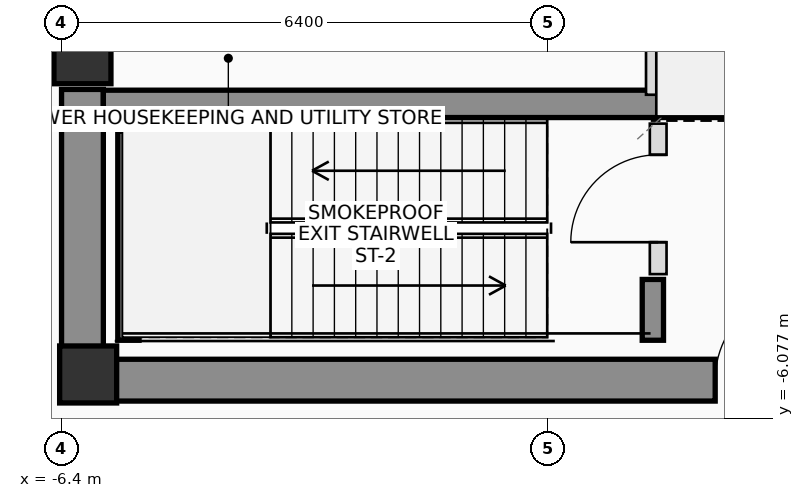
"""IFC4 building model, lengths in metres.
Left out: names, types, materials, properties, quantities, classifications, styles, units other than length and angle.
Written with IfcOpenShell. Run it as: python <this file> out.ifc"""

import sys

from ifc_helpers import new_model, si_unit, direction, frame, frame_2d, origin, origin_2d, place, context, subcontext, project, spatial, rectangle, extrude, source, transform, mapped, element, fill, save


model = new_model("IFC4")
c1 = context("Model", 3, precision=1e-05, world=origin(), true_north=direction((0.0, 1.0)))
c2 = subcontext(c1, "Body", "Model", "MODEL_VIEW")
j1 = project(units=[si_unit("LENGTHUNIT", "METRE"), si_unit("PLANEANGLEUNIT", "RADIAN")], contexts=[c1])
p1 = place(None, origin())
s1 = spatial("IfcSite", under=j1, at=p1, CompositionType="ELEMENT")
p2 = place(p1, origin())
s2 = spatial("IfcBuilding", under=s1, at=p2, CompositionType="ELEMENT")
p3 = place(p2, frame((0.0, 0.0, 224.15)))
s3 = spatial("IfcBuildingStorey", under=s2, at=p3, CompositionType="ELEMENT", Elevation=224.15)
m1 = source(origin(), c2, "Body", "SweptSolid", [
    extrude(rectangle(XDim=0.75, YDim=0.75, at=origin_2d()), origin(), (0.0, 0.0, 1.0), 4.5),
])
p4 = place(p3, frame((-6.05, -5.5, 0.0), z_axis=(0.0, 0.0, 1.0), x_axis=(1.0, 0.0, 0.0)))
e1 = element("IfcColumn", 1, at=p4, inside=s3, PredefinedType="COLUMN", context=c2, shape_type="MappedRepresentation", body=[
    mapped(m1, transform((0.0, 0.0, 0.0), scale=1.0)),
])
p5 = place(p3, frame((-6.4, -5.575, 0.0), z_axis=(0.0, 0.0, 1.0), x_axis=(1.0, 0.0, 0.0)))
e2 = element("IfcWall", 2, at=p5, inside=s3, PredefinedType="SHEAR", context=c2, shape_type="SweptSolid", body=[
    extrude(rectangle(XDim=12.8, YDim=0.55, at=frame_2d((6.4, 0.0))), origin(), (0.0, 0.0, 1.0), 4.5),
])
p6 = place(p5, frame((8.6, 0.0, 0.0)))
e3 = element("IfcOpeningElement", 3, at=p6, cuts=e2, PredefinedType="OPENING", context=c2, shape_type="SweptSolid", body=[
    extrude(rectangle(XDim=1.2, YDim=2.2, at=frame_2d((0.6, 1.1))), frame((0.0, 0.285, 0.0), z_axis=(0.0, -1.0, 0.0), x_axis=(1.0, 0.0, 0.0)), (0.0, 0.0, 1.0), 0.57),
])
p7 = place(p3, frame((-6.125, -5.3, 0.0), z_axis=(0.0, 0.0, 1.0), x_axis=(0.0, 1.0, 0.0)))
e4 = element("IfcWall", 4, at=p7, inside=s3, PredefinedType="SHEAR", context=c2, shape_type="SweptSolid", body=[
    extrude(rectangle(XDim=3.55, YDim=0.55, at=frame_2d((1.775, 0.0))), origin(), (0.0, 0.0, 1.0), 4.5),
])
p8 = place(p3, frame((-5.85, -1.94, 0.0), z_axis=(0.0, 0.0, 1.0), x_axis=(1.0, 0.0, 0.0)))
e5 = element("IfcWall", 5, at=p8, inside=s3, PredefinedType="SHEAR", context=c2, shape_type="SweptSolid", body=[
    extrude(rectangle(XDim=11.7, YDim=0.36, at=frame_2d((5.85, 0.0))), origin(), (0.0, 0.0, 1.0), 4.5),
])
p9 = place(p3, frame((-5.52, -5.05, 0.0), z_axis=(0.0, 0.0, 1.0), x_axis=(0.0, 1.0, 0.0)))
e6 = element("IfcWall", 6, at=p9, inside=s3, PredefinedType="SHEAR", context=c2, shape_type="SweptSolid", body=[
    extrude(rectangle(XDim=2.75, YDim=0.28, at=frame_2d((1.375, 0.0))), origin(), (0.0, 0.0, 1.0), 4.5),
])
p10 = place(p3, frame((1.38, -5.05, 0.0), z_axis=(0.0, 0.0, 1.0), x_axis=(0.0, 1.0, 0.0)))
e7 = element("IfcWall", 7, at=p10, inside=s3, PredefinedType="SHEAR", context=c2, shape_type="SweptSolid", body=[
    extrude(rectangle(XDim=0.8, YDim=0.28, at=frame_2d((0.4, 0.0))), origin(), (0.0, 0.0, 1.0), 4.5),
])
p11 = place(p3, frame((-6.125, -1.3, 0.0), z_axis=(0.0, 0.0, 1.0), x_axis=(1.0, 0.0, 0.0)))
e8 = element("IfcColumn", 8, at=p11, inside=s3, PredefinedType="COLUMN", context=c2, shape_type="MappedRepresentation", body=[
    mapped(m1, transform((0.0, 0.0, 0.0), scale=1.0)),
])
p12 = place(p3, frame((1.45, -4.18, 0.0), z_axis=(0.0, 0.0, 1.0), x_axis=(0.0, 1.0, 0.0)))
e9 = element("IfcWall", 9, at=p12, inside=s3, PredefinedType="PLUMBINGWALL", context=c2, shape_type="SweptSolid", body=[
    extrude(rectangle(XDim=1.98, YDim=0.22, at=frame_2d((0.99, 0.0))), origin(), (0.0, 0.0, 1.0), 4.3),
])
p13 = place(p12, frame((0.42, 0.0, 0.0)))
e10 = element("IfcOpeningElement", 10, at=p13, cuts=e9, PredefinedType="OPENING", context=c2, shape_type="SweptSolid", body=[
    extrude(rectangle(XDim=1.15, YDim=2.15, at=frame_2d((0.575, 1.075))), frame((0.0, 0.12, 0.0), z_axis=(0.0, -1.0, 0.0), x_axis=(1.0, 0.0, 0.0)), (0.0, 0.0, 1.0), 0.24),
])
p14 = place(p3, frame((1.38, -1.82, 0.0), z_axis=(0.0, 0.0, 1.0), x_axis=(0.0, 1.0, 0.0)))
e11 = element("IfcWall", 11, at=p14, inside=s3, PredefinedType="PLUMBINGWALL", context=c2, shape_type="SweptSolid", body=[
    extrude(rectangle(XDim=0.98, YDim=0.18, at=frame_2d((0.49, 0.0))), origin(), (0.0, 0.0, 1.0), 4.3),
])
p15 = place(p6, origin())
e12 = element("IfcDoor", 12, at=p15, inside=s3, OperationType="SINGLE_SWING_RIGHT", PredefinedType="DOOR", context=c2, shape_type="SweptSolid", body=[
    extrude(rectangle(XDim=1.2, YDim=2.2, at=frame_2d((0.6, 1.1))), frame((0.0, 0.025, 0.0), z_axis=(0.0, -1.0, 0.0), x_axis=(1.0, 0.0, 0.0)), (0.0, 0.0, 1.0), 0.05),
])
fill(e3, e12)
p16 = place(p13, origin())
e13 = element("IfcDoor", 13, at=p16, inside=s3, OperationType="SINGLE_SWING_LEFT", PredefinedType="DOOR", context=c2, shape_type="SweptSolid", body=[
    extrude(rectangle(XDim=1.15, YDim=2.15, at=frame_2d((0.575, 1.075))), frame((0.0, 0.025, 0.0), z_axis=(0.0, -1.0, 0.0), x_axis=(1.0, 0.0, 0.0)), (0.0, 0.0, 1.0), 0.05),
])
fill(e10, e13)
save(model, sys.argv[1])
